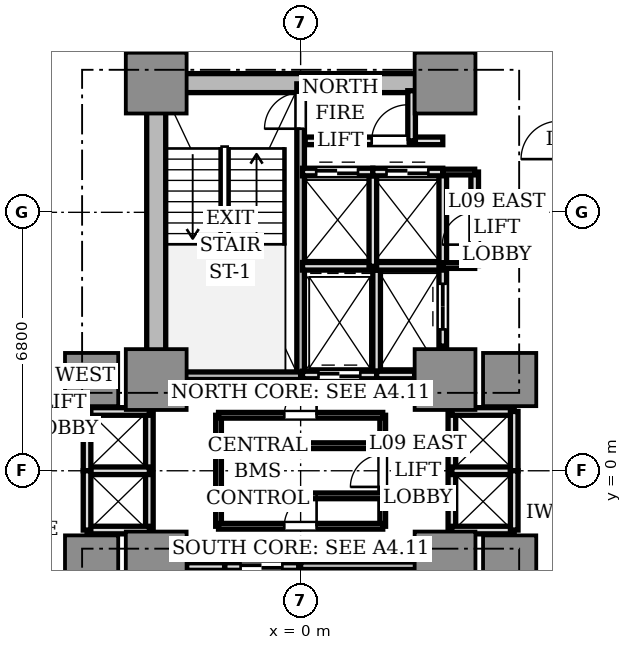
"""IFC4 building model, lengths in metres.
Left out: names, types, materials, properties, quantities, classifications, styles, units other than length and angle.
Written with IfcOpenShell. Run it as: python <this file> out.ifc"""

import sys

from ifc_helpers import new_model, si_unit, direction, frame, frame_2d, origin, origin_2d, place, context, subcontext, project, spatial, rectangle, extrude, source, transform, mapped, element, fill, save


model = new_model("IFC4")
c1 = context("Model", 3, precision=1e-05, world=origin(), true_north=direction((0.0, 1.0)))
c2 = subcontext(c1, "Body", "Model", "MODEL_VIEW")
j1 = project(units=[si_unit("LENGTHUNIT", "METRE"), si_unit("PLANEANGLEUNIT", "RADIAN")], contexts=[c1])
p1 = place(None, origin())
s1 = spatial("IfcSite", under=j1, at=p1, CompositionType="ELEMENT")
p2 = place(p1, origin())
s2 = spatial("IfcBuilding", under=s1, at=p2, CompositionType="ELEMENT")
p3 = place(p2, frame((0.0, 0.0, 36.5)))
s3 = spatial("IfcBuildingStorey", under=s2, at=p3, CompositionType="ELEMENT", Elevation=36.5)
p4 = place(p3, frame((-3.55, 10.2, 0.0), z_axis=(0.0, 0.0, 1.0), x_axis=(1.0, 0.0, 0.0)))
e1 = element("IfcWall", 1, at=p4, inside=s3, PredefinedType="SHEAR", context=c2, shape_type="SweptSolid", body=[
    extrude(rectangle(XDim=7.1, YDim=0.5, at=frame_2d((3.55, 0.0))), origin(), (0.0, 0.0, 1.0), 3.11),
])
p5 = place(p3, frame((-3.8, 2.85, 0.0), z_axis=(0.0, 0.0, 1.0), x_axis=(0.0, 1.0, 0.0)))
e2 = element("IfcWall", 2, at=p5, inside=s3, PredefinedType="SHEAR", context=c2, shape_type="SweptSolid", body=[
    extrude(rectangle(XDim=6.9, YDim=0.5, at=frame_2d((3.45, 0.0))), origin(), (0.0, 0.0, 1.0), 3.11),
])
m1 = source(origin(), c2, "Body", "SweptSolid", [
    extrude(rectangle(XDim=1.6, YDim=1.6, at=origin_2d()), origin(), (0.0, 0.0, 1.0), 3.11),
])
for number, where, z_axis, x_axis in (
    (3, (-3.8, 2.4, 0.0), (0.0, 0.0, 1.0), (1.0, 0.0, 0.0)),
    (4, (3.8, 2.4, 0.0), (0.0, 0.0, 1.0), (1.0, 0.0, 0.0)),
    (5, (-3.8, 10.2, 0.0), (0.0, 0.0, 1.0), (1.0, 0.0, 0.0)),
    (6, (3.8, 10.2, 0.0), (0.0, 0.0, 1.0), (1.0, 0.0, 0.0)),
    (7, (-3.8, -2.4, 0.0), (0.0, 0.0, 1.0), (1.0, 0.0, 0.0)),
    (8, (3.8, -2.4, 0.0), (0.0, 0.0, 1.0), (1.0, 0.0, 0.0)),
):
    element("IfcColumn", number, at=place(p3, frame(where, z_axis=z_axis, x_axis=x_axis)), inside=s3, PredefinedType="COLUMN", context=c2, shape_type="MappedRepresentation", body=[
        mapped(m1, transform((0.0, 0.0, 0.0), scale=1.0)),
    ])
m2 = source(origin(), c2, "Body", "SweptSolid", [
    extrude(rectangle(XDim=1.4, YDim=1.4, at=origin_2d()), origin(), (0.0, 0.0, 1.0), 3.11),
])
for number, where, z_axis, x_axis in (
    (9, (5.5, 2.4, 0.0), (0.0, 0.0, 1.0), (1.0, 0.0, 0.0)),
    (10, (-5.5, 2.4, 0.0), (0.0, 0.0, 1.0), (1.0, 0.0, 0.0)),
    (11, (5.5, -2.4, 0.0), (0.0, 0.0, 1.0), (1.0, 0.0, 0.0)),
    (12, (-5.5, -2.4, 0.0), (0.0, 0.0, 1.0), (1.0, 0.0, 0.0)),
):
    element("IfcColumn", number, at=place(p3, frame(where, z_axis=z_axis, x_axis=x_axis)), inside=s3, PredefinedType="COLUMN", context=c2, shape_type="MappedRepresentation", body=[
        mapped(m2, transform((0.0, 0.0, 0.0), scale=1.0)),
    ])
p6 = place(p3, frame((0.0, 2.5, 0.0), z_axis=(0.0, 0.0, 1.0), x_axis=(0.0, 1.0, 0.0)))
e13 = element("IfcWall", 13, at=p6, inside=s3, PredefinedType="SOLIDWALL", context=c2, shape_type="SweptSolid", body=[
    extrude(rectangle(XDim=7.68, YDim=0.2, at=frame_2d((3.84, 0.0))), origin(), (0.0, 0.0, 1.0), 3.11),
])
p7 = place(p6, frame((6.5, 0.0, 0.0)))
e14 = element("IfcOpeningElement", 14, at=p7, cuts=e13, PredefinedType="OPENING", context=c2, shape_type="SweptSolid", body=[
    extrude(rectangle(XDim=0.95, YDim=2.15, at=frame_2d((0.475, 1.075))), frame((0.0, 0.11, 0.0), z_axis=(0.0, -1.0, 0.0), x_axis=(1.0, 0.0, 0.0)), (0.0, 0.0, 1.0), 0.22),
])
p8 = place(p3, frame((-3.72, 2.5, 0.0), z_axis=(0.0, 0.0, 1.0), x_axis=(1.0, 0.0, 0.0)))
e15 = element("IfcWall", 15, at=p8, inside=s3, PredefinedType="SOLIDWALL", context=c2, shape_type="SweptSolid", body=[
    extrude(rectangle(XDim=3.72, YDim=0.2, at=frame_2d((1.86, 0.0))), origin(), (0.0, 0.0, 1.0), 3.11),
])
p9 = place(p3, frame((0.0, -10.18, 0.0), z_axis=(0.0, 0.0, 1.0), x_axis=(0.0, 1.0, 0.0)))
e16 = element("IfcWall", 16, at=p9, inside=s3, PredefinedType="SOLIDWALL", context=c2, shape_type="SweptSolid", body=[
    extrude(rectangle(XDim=7.68, YDim=0.2, at=frame_2d((3.84, 0.0))), origin(), (0.0, 0.0, 1.0), 3.11),
])
p10 = place(p9, frame((0.28, 0.0, 0.0)))
e17 = element("IfcOpeningElement", 17, at=p10, cuts=e16, PredefinedType="OPENING", context=c2, shape_type="SweptSolid", body=[
    extrude(rectangle(XDim=1.1, YDim=2.15, at=frame_2d((0.55, 1.075))), frame((0.0, 0.11, 0.0), z_axis=(0.0, -1.0, 0.0), x_axis=(1.0, 0.0, 0.0)), (0.0, 0.0, 1.0), 0.22),
])
p11 = place(p3, frame((0.0, -2.5, 0.0), z_axis=(0.0, 0.0, 1.0), x_axis=(1.0, 0.0, 0.0)))
e18 = element("IfcWall", 18, at=p11, inside=s3, PredefinedType="SOLIDWALL", context=c2, shape_type="SweptSolid", body=[
    extrude(rectangle(XDim=3.72, YDim=0.2, at=frame_2d((1.86, 0.0))), origin(), (0.0, 0.0, 1.0), 3.11),
])
p12 = place(p3, frame((2.0, 2.5, 0.0), z_axis=(0.0, 0.0, 1.0), x_axis=(0.0, 1.0, 0.0)))
e19 = element("IfcWall", 19, at=p12, inside=s3, PredefinedType="SOLIDWALL", context=c2, shape_type="SweptSolid", body=[
    extrude(rectangle(XDim=2.78, YDim=0.2, at=frame_2d((1.39, 0.0))), origin(), (0.0, 0.0, 1.0), 2.66),
])
p13 = place(p3, frame((0.05, 2.52, 0.0), z_axis=(0.0, 0.0, 1.0), x_axis=(1.0, 0.0, 0.0)))
e20 = element("IfcWall", 20, at=p13, inside=s3, PredefinedType="SOLIDWALL", context=c2, shape_type="SweptSolid", body=[
    extrude(rectangle(XDim=1.95, YDim=0.2, at=frame_2d((0.975, 0.0))), origin(), (0.0, 0.0, 1.0), 2.66),
])
p14 = place(p13, frame((0.42, 0.0, 0.0)))
e21 = element("IfcOpeningElement", 21, at=p14, cuts=e20, PredefinedType="OPENING", context=c2, shape_type="SweptSolid", body=[
    extrude(rectangle(XDim=1.1, YDim=2.2, at=frame_2d((0.55, 1.1))), frame((0.0, 0.11, 0.0), z_axis=(0.0, -1.0, 0.0), x_axis=(1.0, 0.0, 0.0)), (0.0, 0.0, 1.0), 0.22),
])
p15 = place(p3, frame((-2.0, -5.28, 0.0), z_axis=(0.0, 0.0, 1.0), x_axis=(0.0, 1.0, 0.0)))
e22 = element("IfcWall", 22, at=p15, inside=s3, PredefinedType="SOLIDWALL", context=c2, shape_type="SweptSolid", body=[
    extrude(rectangle(XDim=2.78, YDim=0.2, at=frame_2d((1.39, 0.0))), origin(), (0.0, 0.0, 1.0), 2.66),
])
p16 = place(p3, frame((-2.0, -2.52, 0.0), z_axis=(0.0, 0.0, 1.0), x_axis=(1.0, 0.0, 0.0)))
e23 = element("IfcWall", 23, at=p16, inside=s3, PredefinedType="SOLIDWALL", context=c2, shape_type="SweptSolid", body=[
    extrude(rectangle(XDim=1.95, YDim=0.2, at=frame_2d((0.975, 0.0))), origin(), (0.0, 0.0, 1.0), 2.66),
])
p17 = place(p16, frame((0.42, 0.0, 0.0)))
e24 = element("IfcOpeningElement", 24, at=p17, cuts=e23, PredefinedType="OPENING", context=c2, shape_type="SweptSolid", body=[
    extrude(rectangle(XDim=1.1, YDim=2.2, at=frame_2d((0.55, 1.1))), frame((0.0, 0.11, 0.0), z_axis=(0.0, -1.0, 0.0), x_axis=(1.0, 0.0, 0.0)), (0.0, 0.0, 1.0), 0.22),
])
p18 = place(p3, frame((2.0, 2.52, 0.0), z_axis=(0.0, 0.0, 1.0), x_axis=(1.0, 0.0, 0.0)))
e25 = element("IfcWall", 25, at=p18, inside=s3, PredefinedType="SOLIDWALL", context=c2, shape_type="SweptSolid", body=[
    extrude(rectangle(XDim=1.0, YDim=0.2, at=frame_2d((0.5, 0.0))), origin(), (0.0, 0.0, 1.0), 2.66),
])
p19 = place(p3, frame((3.74, 3.28, 0.0), z_axis=(0.0, 0.0, 1.0), x_axis=(0.0, 1.0, 0.0)))
e26 = element("IfcWall", 26, at=p19, inside=s3, PredefinedType="SOLIDWALL", context=c2, shape_type="SweptSolid", body=[
    extrude(rectangle(XDim=2.08, YDim=0.2, at=frame_2d((1.04, 0.0))), origin(), (0.0, 0.0, 1.0), 2.66),
])
p20 = place(p19, frame((0.44, 0.0, 0.0)))
e27 = element("IfcOpeningElement", 27, at=p20, cuts=e26, PredefinedType="OPENING", context=c2, shape_type="SweptSolid", body=[
    extrude(rectangle(XDim=1.2, YDim=2.2, at=frame_2d((0.6, 1.1))), frame((0.0, 0.11, 0.0), z_axis=(0.0, -1.0, 0.0), x_axis=(1.0, 0.0, 0.0)), (0.0, 0.0, 1.0), 0.22),
])
p21 = place(p3, frame((-3.0, -2.52, 0.0), z_axis=(0.0, 0.0, 1.0), x_axis=(1.0, 0.0, 0.0)))
e28 = element("IfcWall", 28, at=p21, inside=s3, PredefinedType="SOLIDWALL", context=c2, shape_type="SweptSolid", body=[
    extrude(rectangle(XDim=1.0, YDim=0.2, at=frame_2d((0.5, 0.0))), origin(), (0.0, 0.0, 1.0), 2.66),
])
p22 = place(p3, frame((0.05, 5.38, 0.0), z_axis=(0.0, 0.0, 1.0), x_axis=(1.0, 0.0, 0.0)))
e29 = element("IfcWall", 29, at=p22, inside=s3, PredefinedType="SOLIDWALL", context=c2, shape_type="SweptSolid", body=[
    extrude(rectangle(XDim=3.69, YDim=0.2, at=frame_2d((1.845, 0.0))), origin(), (0.0, 0.0, 1.0), 2.66),
])
p23 = place(p3, frame((1.9, 5.38, 0.0), z_axis=(0.0, 0.0, 1.0), x_axis=(0.0, 1.0, 0.0)))
e30 = element("IfcWall", 30, at=p23, inside=s3, PredefinedType="SOLIDWALL", context=c2, shape_type="SweptSolid", body=[
    extrude(rectangle(XDim=2.48, YDim=0.2, at=frame_2d((1.24, 0.0))), origin(), (0.0, 0.0, 1.0), 2.66),
])
p24 = place(p3, frame((0.05, 7.86, 0.0), z_axis=(0.0, 0.0, 1.0), x_axis=(1.0, 0.0, 0.0)))
e31 = element("IfcWall", 31, at=p24, inside=s3, PredefinedType="SOLIDWALL", context=c2, shape_type="SweptSolid", body=[
    extrude(rectangle(XDim=1.85, YDim=0.2, at=frame_2d((0.925, 0.0))), origin(), (0.0, 0.0, 1.0), 2.66),
])
p25 = place(p24, frame((0.36, 0.0, 0.0)))
e32 = element("IfcOpeningElement", 32, at=p25, cuts=e31, PredefinedType="OPENING", context=c2, shape_type="SweptSolid", body=[
    extrude(rectangle(XDim=1.1, YDim=2.2, at=frame_2d((0.55, 1.1))), frame((0.0, 0.11, 0.0), z_axis=(0.0, -1.0, 0.0), x_axis=(1.0, 0.0, 0.0)), (0.0, 0.0, 1.0), 0.22),
])
p26 = place(p3, frame((3.74, 5.38, 0.0), z_axis=(0.0, 0.0, 1.0), x_axis=(0.0, 1.0, 0.0)))
e33 = element("IfcWall", 33, at=p26, inside=s3, PredefinedType="SOLIDWALL", context=c2, shape_type="SweptSolid", body=[
    extrude(rectangle(XDim=2.48, YDim=0.2, at=frame_2d((1.24, 0.0))), origin(), (0.0, 0.0, 1.0), 2.66),
])
p27 = place(p3, frame((1.9, 7.86, 0.0), z_axis=(0.0, 0.0, 1.0), x_axis=(1.0, 0.0, 0.0)))
e34 = element("IfcWall", 34, at=p27, inside=s3, PredefinedType="SOLIDWALL", context=c2, shape_type="SweptSolid", body=[
    extrude(rectangle(XDim=1.84, YDim=0.2, at=frame_2d((0.92, 0.0))), origin(), (0.0, 0.0, 1.0), 2.66),
])
p28 = place(p27, frame((0.36, 0.0, 0.0)))
e35 = element("IfcOpeningElement", 35, at=p28, cuts=e34, PredefinedType="OPENING", context=c2, shape_type="SweptSolid", body=[
    extrude(rectangle(XDim=1.1, YDim=2.2, at=frame_2d((0.55, 1.1))), frame((0.0, 0.11, 0.0), z_axis=(0.0, -1.0, 0.0), x_axis=(1.0, 0.0, 0.0)), (0.0, 0.0, 1.0), 0.22),
])
p29 = place(p3, frame((3.98, -1.56, 0.0), z_axis=(0.0, 0.0, 1.0), x_axis=(0.0, 1.0, 0.0)))
e36 = element("IfcWall", 36, at=p29, inside=s3, PredefinedType="SOLIDWALL", context=c2, shape_type="SweptSolid", body=[
    extrude(rectangle(XDim=3.12, YDim=0.2, at=frame_2d((1.56, 0.0))), origin(), (0.0, 0.0, 1.0), 2.18),
])
for number, where, z_axis, x_axis in (
    (37, (3.98, 1.56, 0.0), (0.0, 0.0, 1.0), (1.0, 0.0, 0.0)),
    (38, (3.98, -1.56, 0.0), (0.0, 0.0, 1.0), (1.0, 0.0, 0.0)),
    (39, (3.98, 0.0, 0.0), (0.0, 0.0, 1.0), (1.0, 0.0, 0.0)),
):
    element("IfcWall", number, at=place(p3, frame(where, z_axis=z_axis, x_axis=x_axis)), inside=s3, PredefinedType="SOLIDWALL", context=c2, shape_type="SweptSolid", body=[
        extrude(rectangle(XDim=1.64, YDim=0.2, at=frame_2d((0.82, 0.0))), origin(), (0.0, 0.0, 1.0), 2.66),
    ])
for number, where, z_axis, x_axis in (
    (40, (5.62, 0.0, 0.0), (0.0, 0.0, 1.0), (0.0, 1.0, 0.0)),
    (41, (5.62, -1.56, 0.0), (0.0, 0.0, 1.0), (0.0, 1.0, 0.0)),
):
    element("IfcWall", number, at=place(p3, frame(where, z_axis=z_axis, x_axis=x_axis)), inside=s3, PredefinedType="SOLIDWALL", context=c2, shape_type="SweptSolid", body=[
        extrude(rectangle(XDim=1.56, YDim=0.2, at=frame_2d((0.78, 0.0))), origin(), (0.0, 0.0, 1.0), 2.66),
    ])
p30 = place(p3, frame((-3.98, -1.56, 0.0), z_axis=(0.0, 0.0, 1.0), x_axis=(0.0, 1.0, 0.0)))
e42 = element("IfcWall", 42, at=p30, inside=s3, PredefinedType="SOLIDWALL", context=c2, shape_type="SweptSolid", body=[
    extrude(rectangle(XDim=3.12, YDim=0.2, at=frame_2d((1.56, 0.0))), origin(), (0.0, 0.0, 1.0), 2.18),
])
for number, where, z_axis, x_axis in (
    (43, (-5.62, 1.56, 0.0), (0.0, 0.0, 1.0), (1.0, 0.0, 0.0)),
    (44, (-5.62, -1.56, 0.0), (0.0, 0.0, 1.0), (1.0, 0.0, 0.0)),
    (45, (-5.62, 0.0, 0.0), (0.0, 0.0, 1.0), (1.0, 0.0, 0.0)),
):
    element("IfcWall", number, at=place(p3, frame(where, z_axis=z_axis, x_axis=x_axis)), inside=s3, PredefinedType="SOLIDWALL", context=c2, shape_type="SweptSolid", body=[
        extrude(rectangle(XDim=1.64, YDim=0.2, at=frame_2d((0.82, 0.0))), origin(), (0.0, 0.0, 1.0), 2.66),
    ])
for number, where, z_axis, x_axis in (
    (46, (-5.62, 0.0, 0.0), (0.0, 0.0, 1.0), (0.0, 1.0, 0.0)),
    (47, (-5.62, -1.56, 0.0), (0.0, 0.0, 1.0), (0.0, 1.0, 0.0)),
):
    element("IfcWall", number, at=place(p3, frame(where, z_axis=z_axis, x_axis=x_axis)), inside=s3, PredefinedType="SOLIDWALL", context=c2, shape_type="SweptSolid", body=[
        extrude(rectangle(XDim=1.56, YDim=0.2, at=frame_2d((0.78, 0.0))), origin(), (0.0, 0.0, 1.0), 2.66),
    ])
p31 = place(p3, frame((0.12, 8.68, 0.0), z_axis=(0.0, 0.0, 1.0), x_axis=(1.0, 0.0, 0.0)))
e48 = element("IfcWall", 48, at=p31, inside=s3, PredefinedType="SOLIDWALL", context=c2, shape_type="SweptSolid", body=[
    extrude(rectangle(XDim=3.62, YDim=0.2, at=frame_2d((1.81, 0.0))), origin(), (0.0, 0.0, 1.0), 2.66),
])
p32 = place(p31, frame((1.75, 0.0, 0.0)))
e49 = element("IfcOpeningElement", 49, at=p32, cuts=e48, PredefinedType="OPENING", context=c2, shape_type="SweptSolid", body=[
    extrude(rectangle(XDim=0.95, YDim=2.15, at=frame_2d((0.475, 1.075))), frame((0.0, 0.11, 0.0), z_axis=(0.0, -1.0, 0.0), x_axis=(1.0, 0.0, 0.0)), (0.0, 0.0, 1.0), 0.22),
])
p33 = place(p3, frame((2.92, 8.68, 0.0), z_axis=(0.0, 0.0, 1.0), x_axis=(0.0, 1.0, 0.0)))
e50 = element("IfcWall", 50, at=p33, inside=s3, PredefinedType="SOLIDWALL", context=c2, shape_type="SweptSolid", body=[
    extrude(rectangle(XDim=1.32, YDim=0.2, at=frame_2d((0.66, 0.0))), origin(), (0.0, 0.0, 1.0), 2.66),
])
p34 = place(p3, frame((4.58, 5.4, 0.0), z_axis=(0.0, 0.0, 1.0), x_axis=(0.0, 1.0, 0.0)))
e51 = element("IfcWall", 51, at=p34, inside=s3, PredefinedType="SOLIDWALL", context=c2, shape_type="SweptSolid", body=[
    extrude(rectangle(XDim=2.46, YDim=0.2, at=frame_2d((1.23, 0.0))), origin(), (0.0, 0.0, 1.0), 2.66),
])
p35 = place(p34, frame((0.55, 0.0, 0.0)))
e52 = element("IfcOpeningElement", 52, at=p35, cuts=e51, PredefinedType="OPENING", context=c2, shape_type="SweptSolid", body=[
    extrude(rectangle(XDim=0.85, YDim=2.1, at=frame_2d((0.425, 1.05))), frame((0.0, 0.11, 0.0), z_axis=(0.0, -1.0, 0.0), x_axis=(1.0, 0.0, 0.0)), (0.0, 0.0, 1.0), 0.22),
])
for number, where, z_axis, x_axis in (
    (53, (3.74, 5.4, 0.0), (0.0, 0.0, 1.0), (1.0, 0.0, 0.0)),
    (54, (3.74, 7.86, 0.0), (0.0, 0.0, 1.0), (1.0, 0.0, 0.0)),
):
    element("IfcWall", number, at=place(p3, frame(where, z_axis=z_axis, x_axis=x_axis)), inside=s3, PredefinedType="PARTITIONING", context=c2, shape_type="SweptSolid", body=[
        extrude(rectangle(XDim=0.84, YDim=0.15, at=frame_2d((0.42, 0.0))), origin(), (0.0, 0.0, 1.0), 2.66),
    ])
p36 = place(p3, frame((2.16, -1.46, 0.0), z_axis=(0.0, 0.0, 1.0), x_axis=(0.0, 1.0, 0.0)))
e55 = element("IfcWall", 55, at=p36, inside=s3, PredefinedType="PARTITIONING", context=c2, shape_type="SweptSolid", body=[
    extrude(rectangle(XDim=2.92, YDim=0.15, at=frame_2d((1.46, 0.0))), origin(), (0.0, 0.0, 1.0), 2.66),
])
p37 = place(p36, frame((1.035, 0.0, 0.0)))
e56 = element("IfcOpeningElement", 56, at=p37, cuts=e55, PredefinedType="OPENING", context=c2, shape_type="SweptSolid", body=[
    extrude(rectangle(XDim=0.85, YDim=2.1, at=frame_2d((0.425, 1.05))), frame((0.0, 0.085, 0.0), z_axis=(0.0, -1.0, 0.0), x_axis=(1.0, 0.0, 0.0)), (0.0, 0.0, 1.0), 0.17),
])
p38 = place(p3, frame((-2.16, -1.46, 0.0), z_axis=(0.0, 0.0, 1.0), x_axis=(0.0, 1.0, 0.0)))
e57 = element("IfcWall", 57, at=p38, inside=s3, PredefinedType="PARTITIONING", context=c2, shape_type="SweptSolid", body=[
    extrude(rectangle(XDim=2.92, YDim=0.15, at=frame_2d((1.46, 0.0))), origin(), (0.0, 0.0, 1.0), 2.66),
])
p39 = place(p3, frame((-2.16, 1.46, 0.0), z_axis=(0.0, 0.0, 1.0), x_axis=(1.0, 0.0, 0.0)))
e58 = element("IfcWall", 58, at=p39, inside=s3, PredefinedType="PARTITIONING", context=c2, shape_type="SweptSolid", body=[
    extrude(rectangle(XDim=4.32, YDim=0.15, at=frame_2d((2.16, 0.0))), origin(), (0.0, 0.0, 1.0), 2.66),
])
p40 = place(p39, frame((1.73, 0.0, 0.0)))
e59 = element("IfcOpeningElement", 59, at=p40, cuts=e58, PredefinedType="OPENING", context=c2, shape_type="SweptSolid", body=[
    extrude(rectangle(XDim=0.85, YDim=2.1, at=frame_2d((0.425, 1.05))), frame((0.0, 0.085, 0.0), z_axis=(0.0, -1.0, 0.0), x_axis=(1.0, 0.0, 0.0)), (0.0, 0.0, 1.0), 0.17),
])
p41 = place(p3, frame((-2.16, -1.46, 0.0), z_axis=(0.0, 0.0, 1.0), x_axis=(1.0, 0.0, 0.0)))
e60 = element("IfcWall", 60, at=p41, inside=s3, PredefinedType="PARTITIONING", context=c2, shape_type="SweptSolid", body=[
    extrude(rectangle(XDim=4.32, YDim=0.15, at=frame_2d((2.16, 0.0))), origin(), (0.0, 0.0, 1.0), 2.66),
])
p42 = place(p41, frame((1.73, 0.0, 0.0)))
e61 = element("IfcOpeningElement", 61, at=p42, cuts=e60, PredefinedType="OPENING", context=c2, shape_type="SweptSolid", body=[
    extrude(rectangle(XDim=0.85, YDim=2.1, at=frame_2d((0.425, 1.05))), frame((0.0, 0.085, 0.0), z_axis=(0.0, -1.0, 0.0), x_axis=(1.0, 0.0, 0.0)), (0.0, 0.0, 1.0), 0.17),
])
for number, where, z_axis, x_axis in (
    (62, (-2.16, 0.66, 0.0), (0.0, 0.0, 1.0), (1.0, 0.0, 0.0)),
    (63, (-2.16, -0.66, 0.0), (0.0, 0.0, 1.0), (1.0, 0.0, 0.0)),
):
    element("IfcWall", number, at=place(p3, frame(where, z_axis=z_axis, x_axis=x_axis)), inside=s3, PredefinedType="PARTITIONING", context=c2, shape_type="SweptSolid", body=[
        extrude(rectangle(XDim=4.32, YDim=0.15, at=frame_2d((2.16, 0.0))), origin(), (0.0, 0.0, 1.0), 2.66),
    ])
m3 = source(origin(), c2, "Body", "SweptSolid", [
    extrude(rectangle(XDim=1.1, YDim=0.05, at=origin_2d()), origin(), (0.0, 0.0, 1.0), 2.2),
])
p43 = place(p14, frame((0.55, 0.0, 0.0)))
e64 = element("IfcDoor", 64, at=p43, inside=s3, OperationType="DOUBLE_DOOR_SLIDING", PredefinedType="DOOR", context=c2, shape_type="MappedRepresentation", body=[
    mapped(m3, transform((0.0, 0.0, 0.0), scale=1.0)),
])
fill(e21, e64)
p44 = place(p17, frame((0.55, 0.0, 0.0)))
e65 = element("IfcDoor", 65, at=p44, inside=s3, OperationType="DOUBLE_DOOR_SLIDING", PredefinedType="DOOR", context=c2, shape_type="MappedRepresentation", body=[
    mapped(m3, transform((0.0, 0.0, 0.0), scale=1.0)),
])
fill(e24, e65)
m4 = source(origin(), c2, "Body", "SweptSolid", [
    extrude(rectangle(XDim=1.2, YDim=0.05, at=origin_2d()), origin(), (0.0, 0.0, 1.0), 2.2),
])
p45 = place(p20, frame((0.6, 0.0, 0.0)))
e66 = element("IfcDoor", 66, at=p45, inside=s3, OperationType="DOUBLE_DOOR_SLIDING", PredefinedType="DOOR", context=c2, shape_type="MappedRepresentation", body=[
    mapped(m4, transform((0.0, 0.0, 0.0), scale=1.0)),
])
fill(e27, e66)
p46 = place(p25, frame((0.55, 0.0, 0.0)))
e67 = element("IfcDoor", 67, at=p46, inside=s3, OperationType="DOUBLE_DOOR_SLIDING", PredefinedType="DOOR", context=c2, shape_type="MappedRepresentation", body=[
    mapped(m3, transform((0.0, 0.0, 0.0), scale=1.0)),
])
fill(e32, e67)
p47 = place(p28, frame((0.55, 0.0, 0.0)))
e68 = element("IfcDoor", 68, at=p47, inside=s3, OperationType="DOUBLE_DOOR_SLIDING", PredefinedType="DOOR", context=c2, shape_type="MappedRepresentation", body=[
    mapped(m3, transform((0.0, 0.0, 0.0), scale=1.0)),
])
fill(e35, e68)
m5 = source(origin(), c2, "Body", "SweptSolid", [
    extrude(rectangle(XDim=0.95, YDim=0.05, at=origin_2d()), origin(), (0.0, 0.0, 1.0), 2.15),
])
p48 = place(p7, frame((0.475, 0.0, 0.0)))
e69 = element("IfcDoor", 69, at=p48, inside=s3, OperationType="SINGLE_SWING_LEFT", PredefinedType="DOOR", context=c2, shape_type="MappedRepresentation", body=[
    mapped(m5, transform((0.0, 0.0, 0.0), scale=1.0)),
])
fill(e14, e69)
p49 = place(p32, frame((0.475, 0.0, 0.0)))
e70 = element("IfcDoor", 70, at=p49, inside=s3, OperationType="SINGLE_SWING_RIGHT", PredefinedType="DOOR", context=c2, shape_type="MappedRepresentation", body=[
    mapped(m5, transform((0.0, 0.0, 0.0), scale=1.0)),
])
fill(e49, e70)
m6 = source(origin(), c2, "Body", "SweptSolid", [
    extrude(rectangle(XDim=0.85, YDim=0.05, at=origin_2d()), origin(), (0.0, 0.0, 1.0), 2.1),
])
p50 = place(p35, frame((0.425, 0.0, 0.0)))
e71 = element("IfcDoor", 71, at=p50, inside=s3, OperationType="SINGLE_SWING_LEFT", PredefinedType="DOOR", context=c2, shape_type="MappedRepresentation", body=[
    mapped(m6, transform((0.0, 0.0, 0.0), scale=1.0)),
])
fill(e52, e71)
p51 = place(p40, frame((0.425, 0.0, 0.0)))
e72 = element("IfcDoor", 72, at=p51, inside=s3, OperationType="SINGLE_SWING_RIGHT", PredefinedType="DOOR", context=c2, shape_type="MappedRepresentation", body=[
    mapped(m6, transform((0.0, 0.0, 0.0), scale=1.0)),
])
fill(e59, e72)
p52 = place(p37, frame((0.425, 0.0, 0.0)))
e73 = element("IfcDoor", 73, at=p52, inside=s3, OperationType="SINGLE_SWING_LEFT", PredefinedType="DOOR", context=c2, shape_type="MappedRepresentation", body=[
    mapped(m6, transform((0.0, 0.0, 0.0), scale=1.0)),
])
fill(e56, e73)
p53 = place(p42, frame((0.425, 0.0, 0.0)))
e74 = element("IfcDoor", 74, at=p53, inside=s3, OperationType="SINGLE_SWING_RIGHT", PredefinedType="DOOR", context=c2, shape_type="MappedRepresentation", body=[
    mapped(m6, transform((0.0, 0.0, 0.0), scale=1.0)),
])
fill(e61, e74)
save(model, sys.argv[1])
